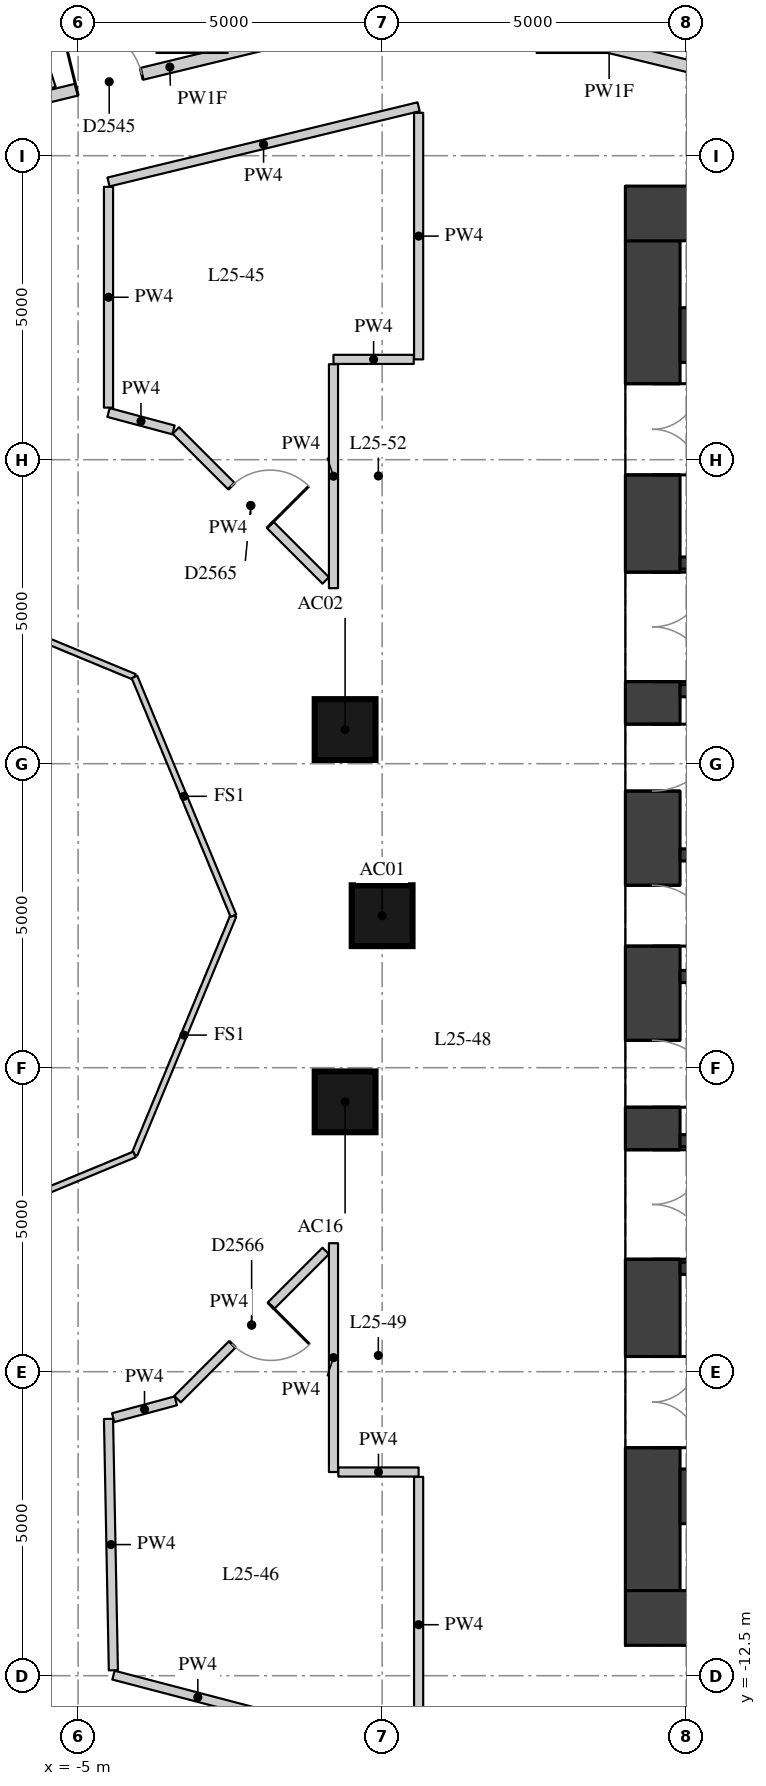
"""IFC4 building model, lengths in metres.
Left out: names, types, materials, properties, quantities, classifications, styles, units other than length and angle.
Written with IfcOpenShell. Run it as: python <this file> out.ifc"""

import sys

from ifc_helpers import new_model, si_unit, direction, frame, frame_2d, origin, origin_2d, place, context, subcontext, project, spatial, rectangle, extrude, element, fill, save


model = new_model("IFC4")
c1 = context("Model", 3, precision=1e-05, world=origin(), true_north=direction((0.0, 1.0)))
c2 = subcontext(c1, "Body", "Model", "MODEL_VIEW")
j1 = project(units=[si_unit("LENGTHUNIT", "METRE"), si_unit("PLANEANGLEUNIT", "RADIAN")], contexts=[c1])
p1 = place(None, origin())
s1 = spatial("IfcSite", under=j1, at=p1, CompositionType="ELEMENT")
p2 = place(p1, origin())
s2 = spatial("IfcBuilding", under=s1, at=p2, CompositionType="ELEMENT")
p3 = place(p2, frame((0.0, 0.0, 92.2)))
s3 = spatial("IfcBuildingStorey", under=s2, at=p3, CompositionType="ELEMENT", Elevation=92.2)
for number, where, z_axis, x_axis in (
    (1, (0.0, 0.0, 0.0), (0.0, 0.0, 1.0), (1.0, 0.0, 0.0)),
    (2, (-0.609, 3.062, 0.0), (0.0, 0.0, 1.0), (1.0, 0.0, 0.0)),
    (3, (-0.609, -3.062, 0.0), (0.0, 0.0, 1.0), (1.0, 0.0, 0.0)),
):
    element("IfcColumn", number, at=place(p3, frame(where, z_axis=z_axis, x_axis=x_axis)), inside=s3, PredefinedType="COLUMN", context=c2, shape_type="SweptSolid", body=[
        extrude(rectangle(XDim=1.0, YDim=1.0, at=origin_2d()), origin(), (0.0, 0.0, 1.0), 3.3),
    ])
p4 = place(p3, frame((4.45, -11.1, 0.0), z_axis=(0.0, 0.0, 1.0), x_axis=(0.0, 1.0, 0.0)))
e4 = element("IfcWall", 4, at=p4, inside=s3, PredefinedType="SHEAR", context=c2, shape_type="SweptSolid", body=[
    extrude(rectangle(XDim=22.2, YDim=0.9, at=frame_2d((11.1, 0.0))), origin(), (0.0, 0.0, 1.0), 3.02),
])
p5 = place(p4, frame((2.35, 0.0, 0.0)))
e5 = element("IfcOpeningElement", 5, at=p5, cuts=e4, PredefinedType="OPENING", context=c2, shape_type="SweptSolid", body=[
    extrude(rectangle(XDim=1.5, YDim=2.1, at=frame_2d((0.75, 1.05))), frame((0.0, 0.46, 0.0), z_axis=(0.0, -1.0, 0.0), x_axis=(1.0, 0.0, 0.0)), (0.0, 0.0, 1.0), 0.92),
])
p6 = place(p4, frame((5.45, 0.0, 0.0)))
e6 = element("IfcOpeningElement", 6, at=p6, cuts=e4, PredefinedType="OPENING", context=c2, shape_type="SweptSolid", body=[
    extrude(rectangle(XDim=1.8, YDim=2.1, at=frame_2d((0.9, 1.05))), frame((0.0, 0.46, 0.0), z_axis=(0.0, -1.0, 0.0), x_axis=(1.0, 0.0, 0.0)), (0.0, 0.0, 1.0), 0.92),
])
p7 = place(p4, frame((7.95, 0.0, 0.0)))
e7 = element("IfcOpeningElement", 7, at=p7, cuts=e4, PredefinedType="OPENING", context=c2, shape_type="SweptSolid", body=[
    extrude(rectangle(XDim=1.1, YDim=2.1, at=frame_2d((0.55, 1.05))), frame((0.0, 0.46, 0.0), z_axis=(0.0, -1.0, 0.0), x_axis=(1.0, 0.0, 0.0)), (0.0, 0.0, 1.0), 0.92),
])
p8 = place(p4, frame((10.6, 0.0, 0.0)))
e8 = element("IfcOpeningElement", 8, at=p8, cuts=e4, PredefinedType="OPENING", context=c2, shape_type="SweptSolid", body=[
    extrude(rectangle(XDim=1.0, YDim=2.1, at=frame_2d((0.5, 1.05))), frame((0.0, 0.46, 0.0), z_axis=(0.0, -1.0, 0.0), x_axis=(1.0, 0.0, 0.0)), (0.0, 0.0, 1.0), 0.92),
])
p9 = place(p4, frame((13.15, 0.0, 0.0)))
e9 = element("IfcOpeningElement", 9, at=p9, cuts=e4, PredefinedType="OPENING", context=c2, shape_type="SweptSolid", body=[
    extrude(rectangle(XDim=1.1, YDim=2.1, at=frame_2d((0.55, 1.05))), frame((0.0, 0.46, 0.0), z_axis=(0.0, -1.0, 0.0), x_axis=(1.0, 0.0, 0.0)), (0.0, 0.0, 1.0), 0.92),
])
p10 = place(p4, frame((14.95, 0.0, 0.0)))
e10 = element("IfcOpeningElement", 10, at=p10, cuts=e4, PredefinedType="OPENING", context=c2, shape_type="SweptSolid", body=[
    extrude(rectangle(XDim=1.8, YDim=2.1, at=frame_2d((0.9, 1.05))), frame((0.0, 0.46, 0.0), z_axis=(0.0, -1.0, 0.0), x_axis=(1.0, 0.0, 0.0)), (0.0, 0.0, 1.0), 0.92),
])
p11 = place(p4, frame((18.35, 0.0, 0.0)))
e11 = element("IfcOpeningElement", 11, at=p11, cuts=e4, PredefinedType="OPENING", context=c2, shape_type="SweptSolid", body=[
    extrude(rectangle(XDim=1.5, YDim=2.1, at=frame_2d((0.75, 1.05))), frame((0.0, 0.46, 0.0), z_axis=(0.0, -1.0, 0.0), x_axis=(1.0, 0.0, 0.0)), (0.0, 0.0, 1.0), 0.92),
])
for number, where, z_axis, x_axis in (
    (12, (4.0, 11.55, 0.0), (0.0, 0.0, 1.0), (1.0, 0.0, 0.0)),
    (13, (4.0, -11.55, 0.0), (0.0, 0.0, 1.0), (1.0, 0.0, 0.0)),
):
    element("IfcWall", number, at=place(p3, frame(where, z_axis=z_axis, x_axis=x_axis)), inside=s3, PredefinedType="SHEAR", context=c2, shape_type="SweptSolid", body=[
        extrude(rectangle(XDim=15.2, YDim=0.9, at=frame_2d((7.6, 0.0))), origin(), (0.0, 0.0, 1.0), 3.02),
    ])
for number, where, z_axis, x_axis in (
    (14, (4.9, 9.55, 0.0), (0.0, 0.0, 1.0), (1.0, 0.0, 0.0)),
    (15, (4.9, -9.55, 0.0), (0.0, 0.0, 1.0), (1.0, 0.0, 0.0)),
):
    element("IfcWall", number, at=place(p3, frame(where, z_axis=z_axis, x_axis=x_axis)), inside=s3, PredefinedType="SHEAR", context=c2, shape_type="SweptSolid", body=[
        extrude(rectangle(XDim=10.2, YDim=0.9, at=frame_2d((5.1, 0.0))), origin(), (0.0, 0.0, 1.0), 3.02),
    ])
p12 = place(p3, frame((4.9, 5.8, 0.0), z_axis=(0.0, 0.0, 1.0), x_axis=(1.0, 0.0, 0.0)))
e16 = element("IfcWall", 16, at=p12, inside=s3, PredefinedType="SHEAR", context=c2, shape_type="SweptSolid", body=[
    extrude(rectangle(XDim=10.2, YDim=0.2, at=frame_2d((5.1, 0.0))), origin(), (0.0, 0.0, 1.0), 3.02),
])
p13 = place(p12, frame((6.75, 0.0, 0.0)))
e17 = element("IfcOpeningElement", 17, at=p13, cuts=e16, PredefinedType="OPENING", context=c2, shape_type="SweptSolid", body=[
    extrude(rectangle(XDim=1.1, YDim=2.1, at=frame_2d((0.55, 1.05))), frame((0.0, 0.11, 0.0), z_axis=(0.0, -1.0, 0.0), x_axis=(1.0, 0.0, 0.0)), (0.0, 0.0, 1.0), 0.22),
])
p14 = place(p12, frame((8.75, 0.0, 0.0)))
e18 = element("IfcOpeningElement", 18, at=p14, cuts=e16, PredefinedType="OPENING", context=c2, shape_type="SweptSolid", body=[
    extrude(rectangle(XDim=1.1, YDim=2.1, at=frame_2d((0.55, 1.05))), frame((0.0, 0.11, 0.0), z_axis=(0.0, -1.0, 0.0), x_axis=(1.0, 0.0, 0.0)), (0.0, 0.0, 1.0), 0.22),
])
p15 = place(p3, frame((4.9, 3.7, 0.0), z_axis=(0.0, 0.0, 1.0), x_axis=(1.0, 0.0, 0.0)))
e19 = element("IfcWall", 19, at=p15, inside=s3, PredefinedType="SHEAR", context=c2, shape_type="SweptSolid", body=[
    extrude(rectangle(XDim=10.2, YDim=0.2, at=frame_2d((5.1, 0.0))), origin(), (0.0, 0.0, 1.0), 3.02),
])
p16 = place(p15, frame((6.3, 0.0, 0.0)))
e20 = element("IfcOpeningElement", 20, at=p16, cuts=e19, PredefinedType="OPENING", context=c2, shape_type="SweptSolid", body=[
    extrude(rectangle(XDim=1.1, YDim=2.1, at=frame_2d((0.55, 1.05))), frame((0.0, 0.11, 0.0), z_axis=(0.0, -1.0, 0.0), x_axis=(1.0, 0.0, 0.0)), (0.0, 0.0, 1.0), 0.22),
])
p17 = place(p15, frame((8.6, 0.0, 0.0)))
e21 = element("IfcOpeningElement", 21, at=p17, cuts=e19, PredefinedType="OPENING", context=c2, shape_type="SweptSolid", body=[
    extrude(rectangle(XDim=1.1, YDim=2.1, at=frame_2d((0.55, 1.05))), frame((0.0, 0.11, 0.0), z_axis=(0.0, -1.0, 0.0), x_axis=(1.0, 0.0, 0.0)), (0.0, 0.0, 1.0), 0.22),
])
for number, where, z_axis, x_axis in (
    (22, (4.9, 1.0, 0.0), (0.0, 0.0, 1.0), (1.0, 0.0, 0.0)),
    (23, (4.9, -1.0, 0.0), (0.0, 0.0, 1.0), (1.0, 0.0, 0.0)),
):
    element("IfcWall", number, at=place(p3, frame(where, z_axis=z_axis, x_axis=x_axis)), inside=s3, PredefinedType="SHEAR", context=c2, shape_type="SweptSolid", body=[
        extrude(rectangle(XDim=10.2, YDim=0.2, at=frame_2d((5.1, 0.0))), origin(), (0.0, 0.0, 1.0), 3.02),
    ])
p18 = place(p3, frame((4.9, -3.7, 0.0), z_axis=(0.0, 0.0, 1.0), x_axis=(1.0, 0.0, 0.0)))
e24 = element("IfcWall", 24, at=p18, inside=s3, PredefinedType="SHEAR", context=c2, shape_type="SweptSolid", body=[
    extrude(rectangle(XDim=10.2, YDim=0.2, at=frame_2d((5.1, 0.0))), origin(), (0.0, 0.0, 1.0), 3.02),
])
p19 = place(p18, frame((6.3, 0.0, 0.0)))
e25 = element("IfcOpeningElement", 25, at=p19, cuts=e24, PredefinedType="OPENING", context=c2, shape_type="SweptSolid", body=[
    extrude(rectangle(XDim=1.1, YDim=2.1, at=frame_2d((0.55, 1.05))), frame((0.0, 0.11, 0.0), z_axis=(0.0, -1.0, 0.0), x_axis=(1.0, 0.0, 0.0)), (0.0, 0.0, 1.0), 0.22),
])
p20 = place(p18, frame((8.6, 0.0, 0.0)))
e26 = element("IfcOpeningElement", 26, at=p20, cuts=e24, PredefinedType="OPENING", context=c2, shape_type="SweptSolid", body=[
    extrude(rectangle(XDim=1.1, YDim=2.1, at=frame_2d((0.55, 1.05))), frame((0.0, 0.11, 0.0), z_axis=(0.0, -1.0, 0.0), x_axis=(1.0, 0.0, 0.0)), (0.0, 0.0, 1.0), 0.22),
])
p21 = place(p3, frame((4.9, -5.8, 0.0), z_axis=(0.0, 0.0, 1.0), x_axis=(1.0, 0.0, 0.0)))
e27 = element("IfcWall", 27, at=p21, inside=s3, PredefinedType="SHEAR", context=c2, shape_type="SweptSolid", body=[
    extrude(rectangle(XDim=10.2, YDim=0.2, at=frame_2d((5.1, 0.0))), origin(), (0.0, 0.0, 1.0), 3.02),
])
p22 = place(p3, frame((-7.783, 12.916, 0.0), z_axis=(0.0, 0.0, 1.0), x_axis=(0.971770455305, 0.235928341232, 0.0)))
e28 = element("IfcWall", 28, at=p22, inside=s3, PredefinedType="PARTITIONING", context=c2, shape_type="SweptSolid", body=[
    extrude(rectangle(XDim=8.832, YDim=0.2, at=frame_2d((4.416, 0.0))), origin(), (0.0, 0.0, 1.0), 2.42),
])
p23 = place(p22, frame((2.84, 0.0, 0.0)))
e29 = element("IfcOpeningElement", 29, at=p23, cuts=e28, PredefinedType="OPENING", context=c2, shape_type="SweptSolid", body=[
    extrude(rectangle(XDim=1.1, YDim=2.1, at=frame_2d((0.55, 1.05))), frame((0.0, 0.11, 0.0), z_axis=(0.0, -1.0, 0.0), x_axis=(1.0, 0.0, 0.0)), (0.0, 0.0, 1.0), 0.22),
])
p24 = place(p22, frame((0.22, 0.0, 0.0)))
e30 = element("IfcOpeningElement", 30, at=p24, cuts=e28, PredefinedType="OPENING", context=c2, shape_type="SweptSolid", body=[
    extrude(rectangle(XDim=1.8, YDim=2.1, at=frame_2d((0.9, 1.05))), frame((0.0, 0.11, 0.0), z_axis=(0.0, -1.0, 0.0), x_axis=(1.0, 0.0, 0.0)), (0.0, 0.0, 1.0), 0.22),
])
p25 = place(p3, frame((0.898, 14.977, 0.0), z_axis=(0.0, 0.0, 1.0), x_axis=(0.971773711573, -0.235914928515, 0.0)))
e31 = element("IfcWall", 31, at=p25, inside=s3, PredefinedType="PARTITIONING", context=c2, shape_type="SweptSolid", body=[
    extrude(rectangle(XDim=5.836, YDim=0.2, at=frame_2d((2.918, 0.0))), origin(), (0.0, 0.0, 1.0), 2.42),
])
p26 = place(p25, frame((0.22, 0.0, 0.0)))
e32 = element("IfcOpeningElement", 32, at=p26, cuts=e31, PredefinedType="OPENING", context=c2, shape_type="SweptSolid", body=[
    extrude(rectangle(XDim=0.9, YDim=2.1, at=frame_2d((0.45, 1.05))), frame((0.0, 0.11, 0.0), z_axis=(0.0, -1.0, 0.0), x_axis=(1.0, 0.0, 0.0)), (0.0, 0.0, 1.0), 0.22),
])
p27 = place(p3, frame((-4.5, 12.067, 0.0), z_axis=(0.0, 0.0, 1.0), x_axis=(0.971799407652, 0.23580905684, 0.0)))
e33 = element("IfcWall", 33, at=p27, inside=s3, PredefinedType="PARTITIONING", context=c2, shape_type="SweptSolid", body=[
    extrude(rectangle(XDim=5.248, YDim=0.15, at=frame_2d((2.624, 0.0))), origin(), (0.0, 0.0, 1.0), 3.02),
])
p28 = place(p3, frame((0.6, 13.205, 0.0), z_axis=(0.0, 0.0, 1.0), x_axis=(0.0, -1.0, 0.0)))
e34 = element("IfcWall", 34, at=p28, inside=s3, PredefinedType="PARTITIONING", context=c2, shape_type="SweptSolid", body=[
    extrude(rectangle(XDim=4.055, YDim=0.15, at=frame_2d((2.027, 0.0))), origin(), (0.0, 0.0, 1.0), 3.02),
])
p29 = place(p3, frame((0.52, 9.15, 0.0), z_axis=(0.0, 0.0, 1.0), x_axis=(-1.0, 0.0, 0.0)))
e35 = element("IfcWall", 35, at=p29, inside=s3, PredefinedType="PARTITIONING", context=c2, shape_type="SweptSolid", body=[
    extrude(rectangle(XDim=1.32, YDim=0.15, at=frame_2d((0.66, 0.0))), origin(), (0.0, 0.0, 1.0), 3.02),
])
p30 = place(p3, frame((-0.8, 9.07, 0.0), z_axis=(0.0, 0.0, 1.0), x_axis=(0.0, -1.0, 0.0)))
e36 = element("IfcWall", 36, at=p30, inside=s3, PredefinedType="PARTITIONING", context=c2, shape_type="SweptSolid", body=[
    extrude(rectangle(XDim=3.683, YDim=0.15, at=frame_2d((1.842, 0.0))), origin(), (0.0, 0.0, 1.0), 3.02),
])
p31 = place(p3, frame((-0.927, 5.514, 0.0), z_axis=(0.0, 0.0, 1.0), x_axis=(-0.707106781187, 0.707106781187, 0.0)))
e37 = element("IfcWall", 37, at=p31, inside=s3, PredefinedType="PARTITIONING", context=c2, shape_type="SweptSolid", body=[
    extrude(rectangle(XDim=3.487, YDim=0.15, at=frame_2d((1.743, 0.0))), origin(), (0.0, 0.0, 1.0), 3.02),
])
p32 = place(p31, frame((1.293, 0.0, 0.0)))
e38 = element("IfcOpeningElement", 38, at=p32, cuts=e37, PredefinedType="OPENING", context=c2, shape_type="SweptSolid", body=[
    extrude(rectangle(XDim=0.9, YDim=2.1, at=frame_2d((0.45, 1.05))), frame((0.0, 0.085, 0.0), z_axis=(0.0, -1.0, 0.0), x_axis=(1.0, 0.0, 0.0)), (0.0, 0.0, 1.0), 0.17),
])
p33 = place(p3, frame((-3.432, 7.99, 0.0), z_axis=(0.0, 0.0, 1.0), x_axis=(-0.965900750832, 0.258912609855, 0.0)))
e39 = element("IfcWall", 39, at=p33, inside=s3, PredefinedType="PARTITIONING", context=c2, shape_type="SweptSolid", body=[
    extrude(rectangle(XDim=1.106, YDim=0.15, at=frame_2d((0.553, 0.0))), origin(), (0.0, 0.0, 1.0), 3.02),
])
p34 = place(p3, frame((-4.5, 8.356, 0.0), z_axis=(0.0, 0.0, 1.0), x_axis=(0.0, 1.0, 0.0)))
e40 = element("IfcWall", 40, at=p34, inside=s3, PredefinedType="PARTITIONING", context=c2, shape_type="SweptSolid", body=[
    extrude(rectangle(XDim=3.631, YDim=0.15, at=frame_2d((1.815, 0.0))), origin(), (0.0, 0.0, 1.0), 3.02),
])
p35 = place(p3, frame((-0.8, -5.386, 0.0), z_axis=(0.0, 0.0, 1.0), x_axis=(0.0, -1.0, 0.0)))
e41 = element("IfcWall", 41, at=p35, inside=s3, PredefinedType="PARTITIONING", context=c2, shape_type="SweptSolid", body=[
    extrude(rectangle(XDim=3.763, YDim=0.15, at=frame_2d((1.882, 0.0))), origin(), (0.0, 0.0, 1.0), 3.02),
])
p36 = place(p3, frame((-0.72, -9.15, 0.0), z_axis=(0.0, 0.0, 1.0), x_axis=(1.0, 0.0, 0.0)))
e42 = element("IfcWall", 42, at=p36, inside=s3, PredefinedType="PARTITIONING", context=c2, shape_type="SweptSolid", body=[
    extrude(rectangle(XDim=1.32, YDim=0.15, at=frame_2d((0.66, 0.0))), origin(), (0.0, 0.0, 1.0), 3.02),
])
p37 = place(p3, frame((0.6, -9.23, 0.0), z_axis=(0.0, 0.0, 1.0), x_axis=(0.0, -1.0, 0.0)))
e43 = element("IfcWall", 43, at=p37, inside=s3, PredefinedType="PARTITIONING", context=c2, shape_type="SweptSolid", body=[
    extrude(rectangle(XDim=4.863, YDim=0.15, at=frame_2d((2.432, 0.0))), origin(), (0.0, 0.0, 1.0), 3.02),
])
p38 = place(p3, frame((-1.644, -13.217, 0.0), z_axis=(0.0, 0.0, 1.0), x_axis=(-0.967446197993, 0.253076774891, 0.0)))
e44 = element("IfcWall", 44, at=p38, inside=s3, PredefinedType="PARTITIONING", context=c2, shape_type="SweptSolid", body=[
    extrude(rectangle(XDim=2.868, YDim=0.15, at=frame_2d((1.434, 0.0))), origin(), (0.0, 0.0, 1.0), 3.02),
])
p39 = place(p3, frame((-4.42, -12.411, 0.0), z_axis=(0.0, 0.0, 1.0), x_axis=(-0.01930438501, 0.999813652997, 0.0)))
e45 = element("IfcWall", 45, at=p39, inside=s3, PredefinedType="PARTITIONING", context=c2, shape_type="SweptSolid", body=[
    extrude(rectangle(XDim=4.135, YDim=0.15, at=frame_2d((2.068, 0.0))), origin(), (0.0, 0.0, 1.0), 3.02),
])
p40 = place(p3, frame((-4.423, -8.256, 0.0), z_axis=(0.0, 0.0, 1.0), x_axis=(0.965880568435, 0.258987890683, 0.0)))
e46 = element("IfcWall", 46, at=p40, inside=s3, PredefinedType="PARTITIONING", context=c2, shape_type="SweptSolid", body=[
    extrude(rectangle(XDim=1.066, YDim=0.15, at=frame_2d((0.533, 0.0))), origin(), (0.0, 0.0, 1.0), 3.02),
])
p41 = place(p3, frame((-3.365, -7.951, 0.0), z_axis=(0.0, 0.0, 1.0), x_axis=(0.707106781187, 0.707106781187, 0.0)))
e47 = element("IfcWall", 47, at=p41, inside=s3, PredefinedType="PARTITIONING", context=c2, shape_type="SweptSolid", body=[
    extrude(rectangle(XDim=3.447, YDim=0.15, at=frame_2d((1.723, 0.0))), origin(), (0.0, 0.0, 1.0), 3.02),
])
p42 = place(p41, frame((1.273, 0.0, 0.0)))
e48 = element("IfcOpeningElement", 48, at=p42, cuts=e47, PredefinedType="OPENING", context=c2, shape_type="SweptSolid", body=[
    extrude(rectangle(XDim=0.9, YDim=2.1, at=frame_2d((0.45, 1.05))), frame((0.0, 0.085, 0.0), z_axis=(0.0, -1.0, 0.0), x_axis=(1.0, 0.0, 0.0)), (0.0, 0.0, 1.0), 0.17),
])
p43 = place(p3, frame((-7.469, 19.622, 0.0), z_axis=(0.0, 0.0, 1.0), x_axis=(0.314576080141, -0.94923226336, 0.0)))
e49 = element("IfcWall", 49, at=p43, inside=s3, PredefinedType="PARTITIONING", context=c2, shape_type="SweptSolid", body=[
    extrude(rectangle(XDim=6.343, YDim=0.22, at=frame_2d((3.171, 0.0))), origin(), (0.0, 0.0, 1.0), 3.02),
])
for number, where, z_axis, x_axis in (
    (50, (-2.446, 0.0, 0.0), (0.0, 0.0, 1.0), (-0.383, -0.924, 0.0)),
    (51, (-4.073, -3.927, 0.0), (0.0, 0.0, 1.0), (-0.924, -0.383, 0.0)),
    (52, (-8.0, 5.554, 0.0), (0.0, 0.0, 1.0), (0.924, -0.383, 0.0)),
    (53, (-4.073, 3.927, 0.0), (0.0, 0.0, 1.0), (0.383, -0.924, 0.0)),
):
    element("IfcWall", number, at=place(p3, frame(where, z_axis=z_axis, x_axis=x_axis)), inside=s3, PredefinedType="PARTITIONING", context=c2, shape_type="SweptSolid", body=[
        extrude(rectangle(XDim=4.251, YDim=0.1, at=frame_2d((2.125, 0.0))), origin(), (0.0, 0.0, 1.0), 3.02),
    ])
p44 = place(p5, origin())
e54 = element("IfcDoor", 54, at=p44, inside=s3, OperationType="DOUBLE_DOOR_SINGLE_SWING", PredefinedType="DOOR", context=c2, shape_type="SweptSolid", body=[
    extrude(rectangle(XDim=1.5, YDim=2.1, at=frame_2d((0.75, 1.05))), frame((0.0, 0.025, 0.0), z_axis=(0.0, -1.0, 0.0), x_axis=(1.0, 0.0, 0.0)), (0.0, 0.0, 1.0), 0.05),
])
fill(e5, e54)
p45 = place(p6, origin())
e55 = element("IfcDoor", 55, at=p45, inside=s3, OperationType="DOUBLE_DOOR_SINGLE_SWING", PredefinedType="DOOR", context=c2, shape_type="SweptSolid", body=[
    extrude(rectangle(XDim=1.8, YDim=2.1, at=frame_2d((0.9, 1.05))), frame((0.0, 0.025, 0.0), z_axis=(0.0, -1.0, 0.0), x_axis=(1.0, 0.0, 0.0)), (0.0, 0.0, 1.0), 0.05),
])
fill(e6, e55)
p46 = place(p7, origin())
e56 = element("IfcDoor", 56, at=p46, inside=s3, OperationType="SINGLE_SWING_RIGHT", PredefinedType="DOOR", context=c2, shape_type="SweptSolid", body=[
    extrude(rectangle(XDim=1.1, YDim=2.1, at=frame_2d((0.55, 1.05))), frame((0.0, 0.025, 0.0), z_axis=(0.0, -1.0, 0.0), x_axis=(1.0, 0.0, 0.0)), (0.0, 0.0, 1.0), 0.05),
])
fill(e7, e56)
p47 = place(p8, origin())
e57 = element("IfcDoor", 57, at=p47, inside=s3, OperationType="SINGLE_SWING_RIGHT", PredefinedType="DOOR", context=c2, shape_type="SweptSolid", body=[
    extrude(rectangle(XDim=1.0, YDim=2.1, at=frame_2d((0.5, 1.05))), frame((0.0, 0.025, 0.0), z_axis=(0.0, -1.0, 0.0), x_axis=(1.0, 0.0, 0.0)), (0.0, 0.0, 1.0), 0.05),
])
fill(e8, e57)
p48 = place(p9, origin())
e58 = element("IfcDoor", 58, at=p48, inside=s3, OperationType="SINGLE_SWING_LEFT", PredefinedType="DOOR", context=c2, shape_type="SweptSolid", body=[
    extrude(rectangle(XDim=1.1, YDim=2.1, at=frame_2d((0.55, 1.05))), frame((0.0, 0.025, 0.0), z_axis=(0.0, -1.0, 0.0), x_axis=(1.0, 0.0, 0.0)), (0.0, 0.0, 1.0), 0.05),
])
fill(e9, e58)
p49 = place(p10, origin())
e59 = element("IfcDoor", 59, at=p49, inside=s3, OperationType="DOUBLE_DOOR_SINGLE_SWING", PredefinedType="DOOR", context=c2, shape_type="SweptSolid", body=[
    extrude(rectangle(XDim=1.8, YDim=2.1, at=frame_2d((0.9, 1.05))), frame((0.0, 0.025, 0.0), z_axis=(0.0, -1.0, 0.0), x_axis=(1.0, 0.0, 0.0)), (0.0, 0.0, 1.0), 0.05),
])
fill(e10, e59)
p50 = place(p11, origin())
e60 = element("IfcDoor", 60, at=p50, inside=s3, OperationType="DOUBLE_DOOR_SINGLE_SWING", PredefinedType="DOOR", context=c2, shape_type="SweptSolid", body=[
    extrude(rectangle(XDim=1.5, YDim=2.1, at=frame_2d((0.75, 1.05))), frame((0.0, 0.025, 0.0), z_axis=(0.0, -1.0, 0.0), x_axis=(1.0, 0.0, 0.0)), (0.0, 0.0, 1.0), 0.05),
])
fill(e11, e60)
p51 = place(p23, origin())
e61 = element("IfcDoor", 61, at=p51, inside=s3, OperationType="SINGLE_SWING_LEFT", PredefinedType="DOOR", context=c2, shape_type="SweptSolid", body=[
    extrude(rectangle(XDim=1.1, YDim=2.1, at=frame_2d((0.55, 1.05))), frame((0.0, 0.025, 0.0), z_axis=(0.0, -1.0, 0.0), x_axis=(1.0, 0.0, 0.0)), (0.0, 0.0, 1.0), 0.05),
])
fill(e29, e61)
p52 = place(p32, origin())
e62 = element("IfcDoor", 62, at=p52, inside=s3, OperationType="SINGLE_SWING_RIGHT", PredefinedType="DOOR", context=c2, shape_type="SweptSolid", body=[
    extrude(rectangle(XDim=0.9, YDim=2.1, at=frame_2d((0.45, 1.05))), frame((0.0, 0.025, 0.0), z_axis=(0.0, -1.0, 0.0), x_axis=(1.0, 0.0, 0.0)), (0.0, 0.0, 1.0), 0.05),
])
fill(e38, e62)
p53 = place(p42, origin())
e63 = element("IfcDoor", 63, at=p53, inside=s3, OperationType="SINGLE_SWING_LEFT", PredefinedType="DOOR", context=c2, shape_type="SweptSolid", body=[
    extrude(rectangle(XDim=0.9, YDim=2.1, at=frame_2d((0.45, 1.05))), frame((0.0, 0.025, 0.0), z_axis=(0.0, -1.0, 0.0), x_axis=(1.0, 0.0, 0.0)), (0.0, 0.0, 1.0), 0.05),
])
fill(e48, e63)
save(model, sys.argv[1])
